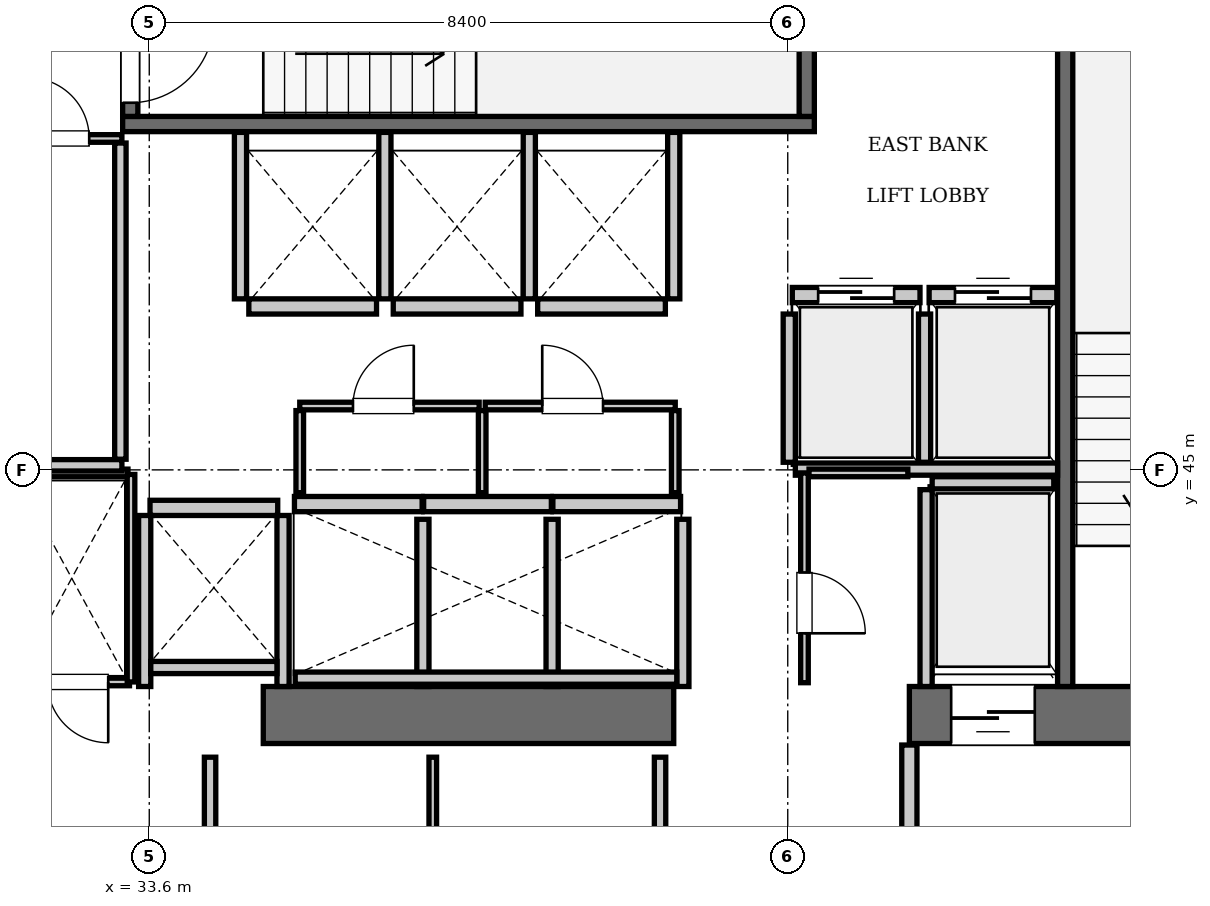
"""IFC4 building model, lengths in metres.
Left out: names, types, materials, properties, quantities, classifications, styles, units other than length and angle.
Written with IfcOpenShell. Run it as: python <this file> out.ifc"""

import sys

from ifc_helpers import new_model, si_unit, direction, frame, frame_2d, origin, place, context, subcontext, project, spatial, rectangle, extrude, element, fill, save


model = new_model("IFC4")
c1 = context("Model", 3, precision=1e-05, world=origin(), true_north=direction((0.0, 1.0)))
c2 = subcontext(c1, "Body", "Model", "MODEL_VIEW")
j1 = project(units=[si_unit("LENGTHUNIT", "METRE"), si_unit("PLANEANGLEUNIT", "RADIAN")], contexts=[c1])
p1 = place(None, origin())
s1 = spatial("IfcSite", under=j1, at=p1, CompositionType="ELEMENT")
p2 = place(p1, origin())
s2 = spatial("IfcBuilding", under=s1, at=p2, CompositionType="ELEMENT")
p3 = place(p2, frame((0.0, 0.0, 215.95)))
s3 = spatial("IfcBuildingStorey", under=s2, at=p3, CompositionType="ELEMENT", Elevation=215.95)
p4 = place(p3, frame((35.1, 41.775, 0.0), z_axis=(0.0, 0.0, 1.0), x_axis=(1.0, 0.0, 0.0)))
e1 = element("IfcWall", 1, at=p4, inside=s3, PredefinedType="SHEAR", context=c2, shape_type="SweptSolid", body=[
    extrude(rectangle(XDim=5.4, YDim=0.75, at=frame_2d((2.7, 0.0))), origin(), (0.0, 0.0, 1.0), 3.85),
])
p5 = place(p3, frame((43.6, 41.775, 0.0), z_axis=(0.0, 0.0, 1.0), x_axis=(1.0, 0.0, 0.0)))
e2 = element("IfcWall", 2, at=p5, inside=s3, PredefinedType="SHEAR", context=c2, shape_type="SweptSolid", body=[
    extrude(rectangle(XDim=6.8, YDim=0.75, at=frame_2d((3.4, 0.0))), origin(), (0.0, 0.0, 1.0), 3.85),
])
p6 = place(p5, frame((3.9, 0.0, 0.0)))
e3 = element("IfcOpeningElement", 3, at=p6, cuts=e2, PredefinedType="OPENING", context=c2, shape_type="SweptSolid", body=[
    extrude(rectangle(XDim=1.15, YDim=2.15, at=frame_2d((0.575, 1.075))), frame((0.0, 0.385, 0.0), z_axis=(0.0, -1.0, 0.0), x_axis=(1.0, 0.0, 0.0)), (0.0, 0.0, 1.0), 0.77),
])
p7 = place(p5, frame((0.55, 0.0, 0.0)))
e4 = element("IfcOpeningElement", 4, at=p7, cuts=e2, PredefinedType="OPENING", context=c2, shape_type="SweptSolid", body=[
    extrude(rectangle(XDim=1.1, YDim=2.2, at=frame_2d((0.55, 1.1))), frame((0.0, 0.385, 0.0), z_axis=(0.0, -1.0, 0.0), x_axis=(1.0, 0.0, 0.0)), (0.0, 0.0, 1.0), 0.77),
])
p8 = place(p3, frame((33.25, 49.55, 0.0), z_axis=(0.0, 0.0, 1.0), x_axis=(1.0, 0.0, 0.0)))
e5 = element("IfcWall", 5, at=p8, inside=s3, PredefinedType="SOLIDWALL", context=c2, shape_type="SweptSolid", body=[
    extrude(rectangle(XDim=9.1, YDim=0.2, at=frame_2d((4.55, 0.0))), origin(), (0.0, 0.0, 1.0), 3.61),
])
p9 = place(p3, frame((42.25, 49.65, 0.0), z_axis=(0.0, 0.0, 1.0), x_axis=(0.0, 1.0, 0.0)))
e6 = element("IfcWall", 6, at=p9, inside=s3, PredefinedType="SOLIDWALL", context=c2, shape_type="SweptSolid", body=[
    extrude(rectangle(XDim=3.6, YDim=0.2, at=frame_2d((1.8, 0.0))), origin(), (0.0, 0.0, 1.0), 3.61),
])
p10 = place(p3, frame((33.35, 49.65, 0.0), z_axis=(0.0, 0.0, 1.0), x_axis=(0.0, 1.0, 0.0)))
e7 = element("IfcWall", 7, at=p10, inside=s3, PredefinedType="SOLIDWALL", context=c2, shape_type="SweptSolid", body=[
    extrude(rectangle(XDim=3.6, YDim=0.2, at=frame_2d((1.8, 0.0))), origin(), (0.0, 0.0, 1.0), 3.61),
])
p11 = place(p10, frame((0.18, 0.0, 0.0)))
e8 = element("IfcOpeningElement", 8, at=p11, cuts=e7, PredefinedType="OPENING", context=c2, shape_type="SweptSolid", body=[
    extrude(rectangle(XDim=1.1, YDim=2.15, at=frame_2d((0.55, 1.075))), frame((0.0, 0.11, 0.0), z_axis=(0.0, -1.0, 0.0), x_axis=(1.0, 0.0, 0.0)), (0.0, 0.0, 1.0), 0.22),
])
p12 = place(p3, frame((45.65, 42.15, 0.0), z_axis=(0.0, 0.0, 1.0), x_axis=(0.0, 1.0, 0.0)))
e9 = element("IfcWall", 9, at=p12, inside=s3, PredefinedType="SOLIDWALL", context=c2, shape_type="SweptSolid", body=[
    extrude(rectangle(XDim=9.0, YDim=0.2, at=frame_2d((4.5, 0.0))), origin(), (0.0, 0.0, 1.0), 3.61),
])
p13 = place(p3, frame((42.06, 47.3, 0.0), z_axis=(0.0, 0.0, 1.0), x_axis=(1.0, 0.0, 0.0)))
e10 = element("IfcWall", 10, at=p13, inside=s3, PredefinedType="SOLIDWALL", context=c2, shape_type="SweptSolid", body=[
    extrude(rectangle(XDim=1.68, YDim=0.2, at=frame_2d((0.84, 0.0))), origin(), (0.0, 0.0, 1.0), 3.61),
])
p14 = place(p13, frame((0.34, 0.0, 0.0)))
e11 = element("IfcOpeningElement", 11, at=p14, cuts=e10, PredefinedType="OPENING", context=c2, shape_type="SweptSolid", body=[
    extrude(rectangle(XDim=1.0, YDim=2.15, at=frame_2d((0.5, 1.075))), frame((0.0, 0.11, 0.0), z_axis=(0.0, -1.0, 0.0), x_axis=(1.0, 0.0, 0.0)), (0.0, 0.0, 1.0), 0.22),
])
p15 = place(p3, frame((43.86, 47.3, 0.0), z_axis=(0.0, 0.0, 1.0), x_axis=(1.0, 0.0, 0.0)))
e12 = element("IfcWall", 12, at=p15, inside=s3, PredefinedType="SOLIDWALL", context=c2, shape_type="SweptSolid", body=[
    extrude(rectangle(XDim=1.68, YDim=0.2, at=frame_2d((0.84, 0.0))), origin(), (0.0, 0.0, 1.0), 3.61),
])
p16 = place(p15, frame((0.34, 0.0, 0.0)))
e13 = element("IfcOpeningElement", 13, at=p16, cuts=e12, PredefinedType="OPENING", context=c2, shape_type="SweptSolid", body=[
    extrude(rectangle(XDim=1.0, YDim=2.15, at=frame_2d((0.5, 1.075))), frame((0.0, 0.11, 0.0), z_axis=(0.0, -1.0, 0.0), x_axis=(1.0, 0.0, 0.0)), (0.0, 0.0, 1.0), 0.22),
])
for number, where, z_axis, x_axis in (
    (14, (35.51, 44.55, 0.0), (0.0, 0.0, 1.0), (1.0, 0.0, 0.0)),
    (15, (37.21, 44.55, 0.0), (0.0, 0.0, 1.0), (1.0, 0.0, 0.0)),
):
    element("IfcWall", number, at=place(p3, frame(where, z_axis=z_axis, x_axis=x_axis)), inside=s3, PredefinedType="SOLIDWALL", context=c2, shape_type="SweptSolid", body=[
        extrude(rectangle(XDim=1.68, YDim=0.2, at=frame_2d((0.84, 0.0))), origin(), (0.0, 0.0, 1.0), 3.61),
    ])
for number, where, z_axis, x_axis in (
    (16, (38.91, 44.55, 0.0), (0.0, 0.0, 1.0), (1.0, 0.0, 0.0)),
    (17, (34.91, 47.15, 0.0), (0.0, 0.0, 1.0), (1.0, 0.0, 0.0)),
):
    element("IfcWall", number, at=place(p3, frame(where, z_axis=z_axis, x_axis=x_axis)), inside=s3, PredefinedType="SOLIDWALL", context=c2, shape_type="SweptSolid", body=[
        extrude(rectangle(XDim=1.68, YDim=0.2, at=frame_2d((0.84, 0.0))), origin(), (0.0, 0.0, 1.0), 3.61),
    ])
for number, where, z_axis, x_axis in (
    (18, (36.81, 47.15, 0.0), (0.0, 0.0, 1.0), (1.0, 0.0, 0.0)),
    (19, (38.71, 47.15, 0.0), (0.0, 0.0, 1.0), (1.0, 0.0, 0.0)),
    (20, (33.61, 44.5, 0.0), (0.0, 0.0, 1.0), (1.0, 0.0, 0.0)),
):
    element("IfcWall", number, at=place(p3, frame(where, z_axis=z_axis, x_axis=x_axis)), inside=s3, PredefinedType="SOLIDWALL", context=c2, shape_type="SweptSolid", body=[
        extrude(rectangle(XDim=1.68, YDim=0.2, at=frame_2d((0.84, 0.0))), origin(), (0.0, 0.0, 1.0), 3.61),
    ])
p17 = place(p3, frame((43.9, 44.83, 0.0), z_axis=(0.0, 0.0, 1.0), x_axis=(1.0, 0.0, 0.0)))
e21 = element("IfcWall", 21, at=p17, inside=s3, PredefinedType="SOLIDWALL", context=c2, shape_type="SweptSolid", body=[
    extrude(rectangle(XDim=1.6, YDim=0.16, at=frame_2d((0.8, 0.0))), origin(), (0.0, 0.0, 1.0), 3.61),
])
p18 = place(p3, frame((43.82, 42.15, 0.0), z_axis=(0.0, 0.0, 1.0), x_axis=(0.0, 1.0, 0.0)))
e22 = element("IfcWall", 22, at=p18, inside=s3, PredefinedType="SOLIDWALL", context=c2, shape_type="SweptSolid", body=[
    extrude(rectangle(XDim=2.59, YDim=0.16, at=frame_2d((1.295, 0.0))), origin(), (0.0, 0.0, 1.0), 3.61),
])
for number, where, z_axis, x_axis in (
    (23, (42.02, 45.1, 0.0), (0.0, 0.0, 1.0), (0.0, 1.0, 0.0)),
    (24, (43.8, 45.1, 0.0), (0.0, 0.0, 1.0), (0.0, 1.0, 0.0)),
):
    element("IfcWall", number, at=place(p3, frame(where, z_axis=z_axis, x_axis=x_axis)), inside=s3, PredefinedType="SOLIDWALL", context=c2, shape_type="SweptSolid", body=[
        extrude(rectangle(XDim=1.95, YDim=0.16, at=frame_2d((0.975, 0.0))), origin(), (0.0, 0.0, 1.0), 3.61),
    ])
p19 = place(p3, frame((42.1, 45.01, 0.0), z_axis=(0.0, 0.0, 1.0), x_axis=(1.0, 0.0, 0.0)))
e25 = element("IfcWall", 25, at=p19, inside=s3, PredefinedType="SOLIDWALL", context=c2, shape_type="SweptSolid", body=[
    extrude(rectangle(XDim=3.45, YDim=0.16, at=frame_2d((1.725, 0.0))), origin(), (0.0, 0.0, 1.0), 3.61),
])
for number, where, z_axis, x_axis in (
    (26, (37.2, 42.15, 0.0), (0.0, 0.0, 1.0), (0.0, 1.0, 0.0)),
    (27, (38.9, 42.15, 0.0), (0.0, 0.0, 1.0), (0.0, 1.0, 0.0)),
    (28, (40.62, 42.15, 0.0), (0.0, 0.0, 1.0), (0.0, 1.0, 0.0)),
):
    element("IfcWall", number, at=place(p3, frame(where, z_axis=z_axis, x_axis=x_axis)), inside=s3, PredefinedType="SOLIDWALL", context=c2, shape_type="SweptSolid", body=[
        extrude(rectangle(XDim=2.2, YDim=0.16, at=frame_2d((1.1, 0.0))), origin(), (0.0, 0.0, 1.0), 3.61),
    ])
p20 = place(p3, frame((35.52, 42.26, 0.0), z_axis=(0.0, 0.0, 1.0), x_axis=(1.0, 0.0, 0.0)))
e29 = element("IfcWall", 29, at=p20, inside=s3, PredefinedType="SOLIDWALL", context=c2, shape_type="SweptSolid", body=[
    extrude(rectangle(XDim=5.02, YDim=0.16, at=frame_2d((2.51, 0.0))), origin(), (0.0, 0.0, 1.0), 3.61),
])
for number, where, z_axis, x_axis in (
    (30, (34.8, 47.25, 0.0), (0.0, 0.0, 1.0), (0.0, 1.0, 0.0)),
    (31, (36.7, 47.25, 0.0), (0.0, 0.0, 1.0), (0.0, 1.0, 0.0)),
    (32, (38.6, 47.25, 0.0), (0.0, 0.0, 1.0), (0.0, 1.0, 0.0)),
    (33, (40.5, 47.25, 0.0), (0.0, 0.0, 1.0), (0.0, 1.0, 0.0)),
):
    element("IfcWall", number, at=place(p3, frame(where, z_axis=z_axis, x_axis=x_axis)), inside=s3, PredefinedType="SOLIDWALL", context=c2, shape_type="SweptSolid", body=[
        extrude(rectangle(XDim=2.19, YDim=0.16, at=frame_2d((1.095, 0.0))), origin(), (0.0, 0.0, 1.0), 3.61),
    ])
for number, where, z_axis, x_axis in (
    (34, (33.54, 42.15, 0.0), (0.0, 0.0, 1.0), (0.0, 1.0, 0.0)),
    (35, (35.36, 42.15, 0.0), (0.0, 0.0, 1.0), (0.0, 1.0, 0.0)),
):
    element("IfcWall", number, at=place(p3, frame(where, z_axis=z_axis, x_axis=x_axis)), inside=s3, PredefinedType="SOLIDWALL", context=c2, shape_type="SweptSolid", body=[
        extrude(rectangle(XDim=2.25, YDim=0.16, at=frame_2d((1.125, 0.0))), origin(), (0.0, 0.0, 1.0), 3.61),
    ])
p21 = place(p3, frame((33.62, 42.4, 0.0), z_axis=(0.0, 0.0, 1.0), x_axis=(1.0, 0.0, 0.0)))
e36 = element("IfcWall", 36, at=p21, inside=s3, PredefinedType="SOLIDWALL", context=c2, shape_type="SweptSolid", body=[
    extrude(rectangle(XDim=1.66, YDim=0.16, at=frame_2d((0.83, 0.0))), origin(), (0.0, 0.0, 1.0), 3.61),
])
p22 = place(p3, frame((43.6, 38.31, 0.0), z_axis=(0.0, 0.0, 1.0), x_axis=(0.0, 1.0, 0.0)))
e37 = element("IfcWall", 37, at=p22, inside=s3, PredefinedType="PARTITIONING", context=c2, shape_type="SweptSolid", body=[
    extrude(rectangle(XDim=3.07, YDim=0.2, at=frame_2d((1.535, 0.0))), origin(), (0.0, 0.0, 1.0), 3.61),
])
p23 = place(p3, frame((32.02, 42.21, 0.0), z_axis=(0.0, 0.0, 1.0), x_axis=(1.0, 0.0, 0.0)))
e38 = element("IfcWall", 38, at=p23, inside=s3, PredefinedType="PARTITIONING", context=c2, shape_type="SweptSolid", body=[
    extrude(rectangle(XDim=1.32, YDim=0.1, at=frame_2d((0.66, 0.0))), origin(), (0.0, 0.0, 1.0), 3.61),
])
p24 = place(p23, frame((0.24, 0.0, 0.0)))
e39 = element("IfcOpeningElement", 39, at=p24, cuts=e38, PredefinedType="OPENING", context=c2, shape_type="SweptSolid", body=[
    extrude(rectangle(XDim=0.8, YDim=2.05, at=frame_2d((0.4, 1.025))), frame((0.0, 0.06, 0.0), z_axis=(0.0, -1.0, 0.0), x_axis=(1.0, 0.0, 0.0)), (0.0, 0.0, 1.0), 0.12),
])
p25 = place(p3, frame((31.84, 44.96, 0.0), z_axis=(0.0, 0.0, 1.0), x_axis=(1.0, 0.0, 0.0)))
e40 = element("IfcWall", 40, at=p25, inside=s3, PredefinedType="PARTITIONING", context=c2, shape_type="SweptSolid", body=[
    extrude(rectangle(XDim=1.48, YDim=0.1, at=frame_2d((0.74, 0.0))), origin(), (0.0, 0.0, 1.0), 3.61),
])
p26 = place(p3, frame((33.36, 42.21, 0.0), z_axis=(0.0, 0.0, 1.0), x_axis=(0.0, 1.0, 0.0)))
e41 = element("IfcWall", 41, at=p26, inside=s3, PredefinedType="PARTITIONING", context=c2, shape_type="SweptSolid", body=[
    extrude(rectangle(XDim=2.73, YDim=0.1, at=frame_2d((1.365, 0.0))), origin(), (0.0, 0.0, 1.0), 3.61),
])
p27 = place(p3, frame((35.58, 45.84, 0.0), z_axis=(0.0, 0.0, 1.0), x_axis=(1.0, 0.0, 0.0)))
e42 = element("IfcWall", 42, at=p27, inside=s3, PredefinedType="PARTITIONING", context=c2, shape_type="SweptSolid", body=[
    extrude(rectangle(XDim=2.36, YDim=0.1, at=frame_2d((1.18, 0.0))), origin(), (0.0, 0.0, 1.0), 3.61),
])
p28 = place(p27, frame((0.7, 0.0, 0.0)))
e43 = element("IfcOpeningElement", 43, at=p28, cuts=e42, PredefinedType="OPENING", context=c2, shape_type="SweptSolid", body=[
    extrude(rectangle(XDim=0.8, YDim=2.05, at=frame_2d((0.4, 1.025))), frame((0.0, 0.06, 0.0), z_axis=(0.0, -1.0, 0.0), x_axis=(1.0, 0.0, 0.0)), (0.0, 0.0, 1.0), 0.12),
])
p29 = place(p3, frame((38.02, 45.84, 0.0), z_axis=(0.0, 0.0, 1.0), x_axis=(1.0, 0.0, 0.0)))
e44 = element("IfcWall", 44, at=p29, inside=s3, PredefinedType="PARTITIONING", context=c2, shape_type="SweptSolid", body=[
    extrude(rectangle(XDim=2.5, YDim=0.1, at=frame_2d((1.25, 0.0))), origin(), (0.0, 0.0, 1.0), 3.61),
])
p30 = place(p29, frame((0.75, 0.0, 0.0)))
e45 = element("IfcOpeningElement", 45, at=p30, cuts=e44, PredefinedType="OPENING", context=c2, shape_type="SweptSolid", body=[
    extrude(rectangle(XDim=0.8, YDim=2.05, at=frame_2d((0.4, 1.025))), frame((0.0, 0.06, 0.0), z_axis=(0.0, -1.0, 0.0), x_axis=(1.0, 0.0, 0.0)), (0.0, 0.0, 1.0), 0.12),
])
for number, where, z_axis, x_axis in (
    (46, (35.58, 44.7, 0.0), (0.0, 0.0, 1.0), (0.0, 1.0, 0.0)),
    (47, (37.98, 44.7, 0.0), (0.0, 0.0, 1.0), (0.0, 1.0, 0.0)),
    (48, (40.52, 44.7, 0.0), (0.0, 0.0, 1.0), (0.0, 1.0, 0.0)),
):
    element("IfcWall", number, at=place(p3, frame(where, z_axis=z_axis, x_axis=x_axis)), inside=s3, PredefinedType="PARTITIONING", context=c2, shape_type="SweptSolid", body=[
        extrude(rectangle(XDim=1.08, YDim=0.1, at=frame_2d((0.54, 0.0))), origin(), (0.0, 0.0, 1.0), 3.61),
    ])
p31 = place(p3, frame((42.22, 42.2, 0.0), z_axis=(0.0, 0.0, 1.0), x_axis=(0.0, 1.0, 0.0)))
e49 = element("IfcWall", 49, at=p31, inside=s3, PredefinedType="PARTITIONING", context=c2, shape_type="SweptSolid", body=[
    extrude(rectangle(XDim=2.76, YDim=0.1, at=frame_2d((1.38, 0.0))), origin(), (0.0, 0.0, 1.0), 3.61),
])
p32 = place(p31, frame((0.65, 0.0, 0.0)))
e50 = element("IfcOpeningElement", 50, at=p32, cuts=e49, PredefinedType="OPENING", context=c2, shape_type="SweptSolid", body=[
    extrude(rectangle(XDim=0.8, YDim=2.05, at=frame_2d((0.4, 1.025))), frame((0.0, 0.06, 0.0), z_axis=(0.0, -1.0, 0.0), x_axis=(1.0, 0.0, 0.0)), (0.0, 0.0, 1.0), 0.12),
])
p33 = place(p3, frame((42.28, 44.96, 0.0), z_axis=(0.0, 0.0, 1.0), x_axis=(1.0, 0.0, 0.0)))
e51 = element("IfcWall", 51, at=p33, inside=s3, PredefinedType="PARTITIONING", context=c2, shape_type="SweptSolid", body=[
    extrude(rectangle(XDim=1.3, YDim=0.1, at=frame_2d((0.65, 0.0))), origin(), (0.0, 0.0, 1.0), 3.61),
])
p34 = place(p3, frame((30.06, 45.06, 0.0), z_axis=(0.0, 0.0, 1.0), x_axis=(1.0, 0.0, 0.0)))
e52 = element("IfcWall", 52, at=p34, inside=s3, PredefinedType="PARTITIONING", context=c2, shape_type="SweptSolid", body=[
    extrude(rectangle(XDim=3.18, YDim=0.15, at=frame_2d((1.59, 0.0))), origin(), (0.0, 0.0, 1.0), 3.61),
])
p35 = place(p3, frame((33.22, 45.14, 0.0), z_axis=(0.0, 0.0, 1.0), x_axis=(0.0, 1.0, 0.0)))
e53 = element("IfcWall", 53, at=p35, inside=s3, PredefinedType="PARTITIONING", context=c2, shape_type="SweptSolid", body=[
    extrude(rectangle(XDim=4.16, YDim=0.15, at=frame_2d((2.08, 0.0))), origin(), (0.0, 0.0, 1.0), 3.61),
])
p36 = place(p3, frame((30.06, 49.36, 0.0), z_axis=(0.0, 0.0, 1.0), x_axis=(1.0, 0.0, 0.0)))
e54 = element("IfcWall", 54, at=p36, inside=s3, PredefinedType="PARTITIONING", context=c2, shape_type="SweptSolid", body=[
    extrude(rectangle(XDim=3.18, YDim=0.1, at=frame_2d((1.59, 0.0))), origin(), (0.0, 0.0, 1.0), 3.61),
])
p37 = place(p36, frame((1.95, 0.0, 0.0)))
e55 = element("IfcOpeningElement", 55, at=p37, cuts=e54, PredefinedType="OPENING", context=c2, shape_type="SweptSolid", body=[
    extrude(rectangle(XDim=0.8, YDim=2.05, at=frame_2d((0.4, 1.025))), frame((0.0, 0.06, 0.0), z_axis=(0.0, -1.0, 0.0), x_axis=(1.0, 0.0, 0.0)), (0.0, 0.0, 1.0), 0.12),
])
p38 = place(p3, frame((34.4, 38.38, 0.0), z_axis=(0.0, 0.0, 1.0), x_axis=(0.0, 1.0, 0.0)))
e56 = element("IfcWall", 56, at=p38, inside=s3, PredefinedType="PARTITIONING", context=c2, shape_type="SweptSolid", body=[
    extrude(rectangle(XDim=2.84, YDim=0.15, at=frame_2d((1.42, 0.0))), origin(), (0.0, 0.0, 1.0), 3.61),
])
p39 = place(p3, frame((37.33, 38.38, 0.0), z_axis=(0.0, 0.0, 1.0), x_axis=(0.0, 1.0, 0.0)))
e57 = element("IfcWall", 57, at=p39, inside=s3, PredefinedType="PARTITIONING", context=c2, shape_type="SweptSolid", body=[
    extrude(rectangle(XDim=2.84, YDim=0.1, at=frame_2d((1.42, 0.0))), origin(), (0.0, 0.0, 1.0), 3.61),
])
p40 = place(p3, frame((40.32, 38.38, 0.0), z_axis=(0.0, 0.0, 1.0), x_axis=(0.0, 1.0, 0.0)))
e58 = element("IfcWall", 58, at=p40, inside=s3, PredefinedType="PARTITIONING", context=c2, shape_type="SweptSolid", body=[
    extrude(rectangle(XDim=2.84, YDim=0.15, at=frame_2d((1.42, 0.0))), origin(), (0.0, 0.0, 1.0), 3.61),
])
p41 = place(p11, frame((1.1, 0.0, 0.0), z_axis=(0.0, 0.0, 1.0), x_axis=(-1.0, 0.0, 0.0)))
e59 = element("IfcDoor", 59, at=p41, inside=s3, OperationType="SINGLE_SWING_LEFT", PredefinedType="DOOR", context=c2, shape_type="SweptSolid", body=[
    extrude(rectangle(XDim=1.1, YDim=2.15, at=frame_2d((0.55, 1.075))), frame((0.0, 0.025, 0.0), z_axis=(0.0, -1.0, 0.0), x_axis=(1.0, 0.0, 0.0)), (0.0, 0.0, 1.0), 0.05),
])
fill(e8, e59)
p42 = place(p14, origin())
e60 = element("IfcDoor", 60, at=p42, inside=s3, OperationType="SLIDING_TO_LEFT", PredefinedType="DOOR", context=c2, shape_type="SweptSolid", body=[
    extrude(rectangle(XDim=1.0, YDim=2.15, at=frame_2d((0.5, 1.075))), frame((0.0, 0.025, 0.0), z_axis=(0.0, -1.0, 0.0), x_axis=(1.0, 0.0, 0.0)), (0.0, 0.0, 1.0), 0.05),
])
fill(e11, e60)
p43 = place(p16, origin())
e61 = element("IfcDoor", 61, at=p43, inside=s3, OperationType="SLIDING_TO_LEFT", PredefinedType="DOOR", context=c2, shape_type="SweptSolid", body=[
    extrude(rectangle(XDim=1.0, YDim=2.15, at=frame_2d((0.5, 1.075))), frame((0.0, 0.025, 0.0), z_axis=(0.0, -1.0, 0.0), x_axis=(1.0, 0.0, 0.0)), (0.0, 0.0, 1.0), 0.05),
])
fill(e13, e61)
p44 = place(p7, frame((1.1, 0.0, 0.0), z_axis=(0.0, 0.0, 1.0), x_axis=(-1.0, 0.0, 0.0)))
e62 = element("IfcDoor", 62, at=p44, inside=s3, OperationType="SLIDING_TO_LEFT", PredefinedType="DOOR", context=c2, shape_type="SweptSolid", body=[
    extrude(rectangle(XDim=1.1, YDim=2.2, at=frame_2d((0.55, 1.1))), frame((0.0, 0.025, 0.0), z_axis=(0.0, -1.0, 0.0), x_axis=(1.0, 0.0, 0.0)), (0.0, 0.0, 1.0), 0.05),
])
fill(e4, e62)
p45 = place(p24, frame((0.8, 0.0, 0.0), z_axis=(0.0, 0.0, 1.0), x_axis=(-1.0, 0.0, 0.0)))
e63 = element("IfcDoor", 63, at=p45, inside=s3, OperationType="SINGLE_SWING_LEFT", PredefinedType="DOOR", context=c2, shape_type="SweptSolid", body=[
    extrude(rectangle(XDim=0.8, YDim=2.05, at=frame_2d((0.4, 1.025))), frame((0.0, 0.025, 0.0), z_axis=(0.0, -1.0, 0.0), x_axis=(1.0, 0.0, 0.0)), (0.0, 0.0, 1.0), 0.05),
])
fill(e39, e63)
p46 = place(p28, origin())
e64 = element("IfcDoor", 64, at=p46, inside=s3, OperationType="SINGLE_SWING_RIGHT", PredefinedType="DOOR", context=c2, shape_type="SweptSolid", body=[
    extrude(rectangle(XDim=0.8, YDim=2.05, at=frame_2d((0.4, 1.025))), frame((0.0, 0.025, 0.0), z_axis=(0.0, -1.0, 0.0), x_axis=(1.0, 0.0, 0.0)), (0.0, 0.0, 1.0), 0.05),
])
fill(e43, e64)
p47 = place(p30, origin())
e65 = element("IfcDoor", 65, at=p47, inside=s3, OperationType="SINGLE_SWING_LEFT", PredefinedType="DOOR", context=c2, shape_type="SweptSolid", body=[
    extrude(rectangle(XDim=0.8, YDim=2.05, at=frame_2d((0.4, 1.025))), frame((0.0, 0.025, 0.0), z_axis=(0.0, -1.0, 0.0), x_axis=(1.0, 0.0, 0.0)), (0.0, 0.0, 1.0), 0.05),
])
fill(e45, e65)
p48 = place(p32, frame((0.8, 0.0, 0.0), z_axis=(0.0, 0.0, 1.0), x_axis=(-1.0, 0.0, 0.0)))
e66 = element("IfcDoor", 66, at=p48, inside=s3, OperationType="SINGLE_SWING_RIGHT", PredefinedType="DOOR", context=c2, shape_type="SweptSolid", body=[
    extrude(rectangle(XDim=0.8, YDim=2.05, at=frame_2d((0.4, 1.025))), frame((0.0, 0.025, 0.0), z_axis=(0.0, -1.0, 0.0), x_axis=(1.0, 0.0, 0.0)), (0.0, 0.0, 1.0), 0.05),
])
fill(e50, e66)
p49 = place(p37, origin())
e67 = element("IfcDoor", 67, at=p49, inside=s3, OperationType="SINGLE_SWING_LEFT", PredefinedType="DOOR", context=c2, shape_type="SweptSolid", body=[
    extrude(rectangle(XDim=0.8, YDim=2.05, at=frame_2d((0.4, 1.025))), frame((0.0, 0.025, 0.0), z_axis=(0.0, -1.0, 0.0), x_axis=(1.0, 0.0, 0.0)), (0.0, 0.0, 1.0), 0.05),
])
fill(e55, e67)
save(model, sys.argv[1])
